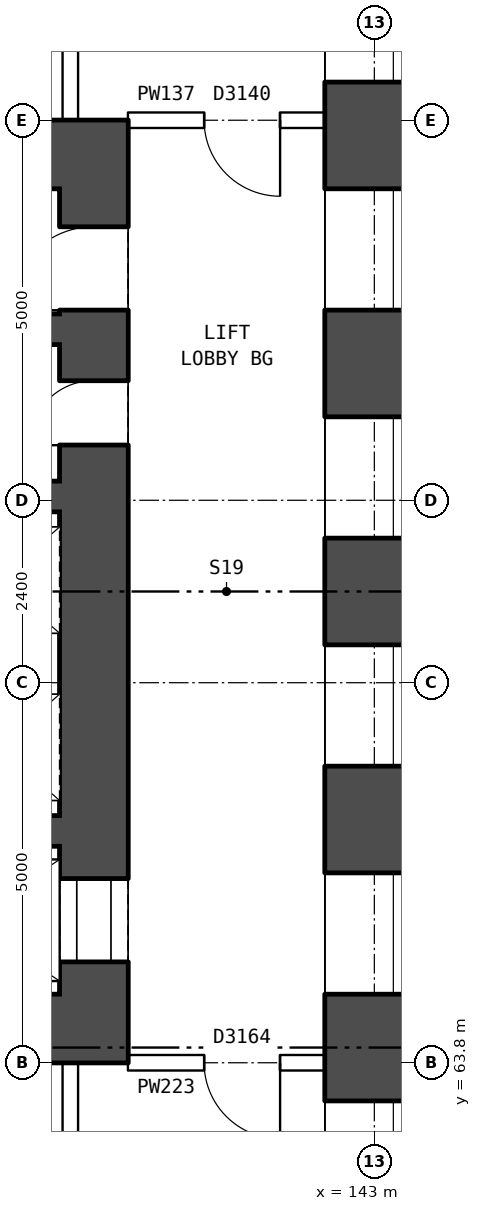
"""IFC4 building model, lengths in metres.
Left out: names, types, materials, properties, quantities, classifications, styles, units other than length and angle.
Written with IfcOpenShell. Run it as: python <this file> out.ifc"""

import sys

from ifc_helpers import new_model, si_unit, direction, frame, frame_2d, origin, place, context, subcontext, project, spatial, rectangle, extrude, element, fill, save


model = new_model("IFC4")
c1 = context("Model", 3, precision=1e-05, world=origin(), true_north=direction((0.0, 1.0)))
c2 = subcontext(c1, "Body", "Model", "MODEL_VIEW")
j1 = project(units=[si_unit("LENGTHUNIT", "METRE"), si_unit("PLANEANGLEUNIT", "RADIAN")], contexts=[c1])
p1 = place(None, origin())
s1 = spatial("IfcSite", under=j1, at=p1, CompositionType="ELEMENT")
p2 = place(p1, origin())
s2 = spatial("IfcBuilding", under=s1, at=p2, CompositionType="ELEMENT")
p3 = place(p2, frame((0.0, 0.0, 5.5)))
s3 = spatial("IfcBuildingStorey", under=s2, at=p3, CompositionType="ELEMENT", Elevation=5.5)
p4 = place(p3, frame((142.95, 56.4, -0.3), z_axis=(0.0, 0.0, 1.0), x_axis=(0.0, 1.0, 0.0)))
e1 = element("IfcWall", 1, at=p4, inside=s3, PredefinedType="SHEAR", context=c2, shape_type="SweptSolid", body=[
    extrude(rectangle(XDim=27.2, YDim=1.2, at=frame_2d((13.6, 0.0))), origin(), (0.0, 0.0, 1.0), 4.6),
])
p5 = place(p4, frame((2.3, 0.0, 0.8)))
e2 = element("IfcOpeningElement", 2, at=p5, cuts=e1, PredefinedType="OPENING", context=c2, shape_type="SweptSolid", body=[
    extrude(rectangle(XDim=1.6, YDim=1.8, at=frame_2d((0.8, 0.9))), frame((0.0, 0.61, 0.0), z_axis=(0.0, -1.0, 0.0), x_axis=(1.0, 0.0, 0.0)), (0.0, 0.0, 1.0), 1.22),
])
p6 = place(p4, frame((5.3, 0.0, 0.8)))
e3 = element("IfcOpeningElement", 3, at=p6, cuts=e1, PredefinedType="OPENING", context=c2, shape_type="SweptSolid", body=[
    extrude(rectangle(XDim=1.6, YDim=1.8, at=frame_2d((0.8, 0.9))), frame((0.0, 0.61, 0.0), z_axis=(0.0, -1.0, 0.0), x_axis=(1.0, 0.0, 0.0)), (0.0, 0.0, 1.0), 1.22),
])
p7 = place(p4, frame((8.3, 0.0, 0.8)))
e4 = element("IfcOpeningElement", 4, at=p7, cuts=e1, PredefinedType="OPENING", context=c2, shape_type="SweptSolid", body=[
    extrude(rectangle(XDim=1.6, YDim=1.8, at=frame_2d((0.8, 0.9))), frame((0.0, 0.61, 0.0), z_axis=(0.0, -1.0, 0.0), x_axis=(1.0, 0.0, 0.0)), (0.0, 0.0, 1.0), 1.22),
])
p8 = place(p4, frame((11.3, 0.0, 0.8)))
e5 = element("IfcOpeningElement", 5, at=p8, cuts=e1, PredefinedType="OPENING", context=c2, shape_type="SweptSolid", body=[
    extrude(rectangle(XDim=1.6, YDim=1.8, at=frame_2d((0.8, 0.9))), frame((0.0, 0.61, 0.0), z_axis=(0.0, -1.0, 0.0), x_axis=(1.0, 0.0, 0.0)), (0.0, 0.0, 1.0), 1.22),
])
p9 = place(p4, frame((14.3, 0.0, 0.8)))
e6 = element("IfcOpeningElement", 6, at=p9, cuts=e1, PredefinedType="OPENING", context=c2, shape_type="SweptSolid", body=[
    extrude(rectangle(XDim=1.6, YDim=1.8, at=frame_2d((0.8, 0.9))), frame((0.0, 0.61, 0.0), z_axis=(0.0, -1.0, 0.0), x_axis=(1.0, 0.0, 0.0)), (0.0, 0.0, 1.0), 1.22),
])
p10 = place(p4, frame((17.3, 0.0, 0.8)))
e7 = element("IfcOpeningElement", 7, at=p10, cuts=e1, PredefinedType="OPENING", context=c2, shape_type="SweptSolid", body=[
    extrude(rectangle(XDim=1.6, YDim=1.8, at=frame_2d((0.8, 0.9))), frame((0.0, 0.61, 0.0), z_axis=(0.0, -1.0, 0.0), x_axis=(1.0, 0.0, 0.0)), (0.0, 0.0, 1.0), 1.22),
])
p11 = place(p4, frame((20.3, 0.0, 0.8)))
e8 = element("IfcOpeningElement", 8, at=p11, cuts=e1, PredefinedType="OPENING", context=c2, shape_type="SweptSolid", body=[
    extrude(rectangle(XDim=1.6, YDim=1.8, at=frame_2d((0.8, 0.9))), frame((0.0, 0.61, 0.0), z_axis=(0.0, -1.0, 0.0), x_axis=(1.0, 0.0, 0.0)), (0.0, 0.0, 1.0), 1.22),
])
p12 = place(p4, frame((23.3, 0.0, 0.8)))
e9 = element("IfcOpeningElement", 9, at=p12, cuts=e1, PredefinedType="OPENING", context=c2, shape_type="SweptSolid", body=[
    extrude(rectangle(XDim=1.6, YDim=1.8, at=frame_2d((0.8, 0.9))), frame((0.0, 0.61, 0.0), z_axis=(0.0, -1.0, 0.0), x_axis=(1.0, 0.0, 0.0)), (0.0, 0.0, 1.0), 1.22),
])
p13 = place(p3, frame((139.31, 64.7, 0.0), z_axis=(0.0, 0.0, 1.0), x_axis=(0.0, 1.0, 0.0)))
e10 = element("IfcWall", 10, at=p13, inside=s3, PredefinedType="SHEAR", context=c2, shape_type="SweptSolid", body=[
    extrude(rectangle(XDim=10.6, YDim=0.9, at=frame_2d((5.3, 0.0))), origin(), (0.0, 0.0, 1.0), 4.3),
])
p14 = place(p13, frame((0.425, 0.0, 0.0)))
e11 = element("IfcOpeningElement", 11, at=p14, cuts=e10, PredefinedType="OPENING", context=c2, shape_type="SweptSolid", body=[
    extrude(rectangle(XDim=1.1, YDim=2.1, at=frame_2d((0.55, 1.05))), frame((0.0, 0.46, 0.0), z_axis=(0.0, -1.0, 0.0), x_axis=(1.0, 0.0, 0.0)), (0.0, 0.0, 1.0), 0.92),
])
p15 = place(p13, frame((9.0, 0.0, 0.0)))
e12 = element("IfcOpeningElement", 12, at=p15, cuts=e10, PredefinedType="OPENING", context=c2, shape_type="SweptSolid", body=[
    extrude(rectangle(XDim=1.1, YDim=2.1, at=frame_2d((0.55, 1.05))), frame((0.0, 0.46, 0.0), z_axis=(0.0, -1.0, 0.0), x_axis=(1.0, 0.0, 0.0)), (0.0, 0.0, 1.0), 0.92),
])
p16 = place(p13, frame((7.225, 0.0, 0.0)))
e13 = element("IfcOpeningElement", 13, at=p16, cuts=e10, PredefinedType="OPENING", context=c2, shape_type="SweptSolid", body=[
    extrude(rectangle(XDim=0.85, YDim=2.1, at=frame_2d((0.425, 1.05))), frame((0.0, 0.46, 0.0), z_axis=(0.0, -1.0, 0.0), x_axis=(1.0, 0.0, 0.0)), (0.0, 0.0, 1.0), 0.92),
])
for number, where, z_axis, x_axis in (
    (14, (139.76, 64.25, 0.0), (0.0, 0.0, 1.0), (-1.0, 0.0, 0.0)),
    (15, (139.76, 75.75, 0.0), (0.0, 0.0, 1.0), (-1.0, 0.0, 0.0)),
):
    element("IfcWall", number, at=place(p3, frame(where, z_axis=z_axis, x_axis=x_axis)), inside=s3, PredefinedType="SHEAR", context=c2, shape_type="SweptSolid", body=[
        extrude(rectangle(XDim=8.4, YDim=0.9, at=frame_2d((4.2, 0.0))), origin(), (0.0, 0.0, 1.0), 4.3),
    ])
p17 = place(p3, frame((138.86, 66.85, 0.0), z_axis=(0.0, 0.0, 1.0), x_axis=(-1.0, 0.0, 0.0)))
e16 = element("IfcWall", 16, at=p17, inside=s3, PredefinedType="SHEAR", context=c2, shape_type="SweptSolid", body=[
    extrude(rectangle(XDim=3.7, YDim=0.4, at=frame_2d((1.85, 0.0))), origin(), (0.0, 0.0, 1.0), 4.3),
])
p18 = place(p3, frame((138.86, 71.25, 0.0), z_axis=(0.0, 0.0, 1.0), x_axis=(-1.0, 0.0, 0.0)))
e17 = element("IfcWall", 17, at=p18, inside=s3, PredefinedType="SHEAR", context=c2, shape_type="SweptSolid", body=[
    extrude(rectangle(XDim=6.6, YDim=0.4, at=frame_2d((3.3, 0.0))), origin(), (0.0, 0.0, 1.0), 4.3),
])
p19 = place(p18, frame((4.25, 0.0, 0.0)))
e18 = element("IfcOpeningElement", 18, at=p19, cuts=e17, PredefinedType="OPENING", context=c2, shape_type="SweptSolid", body=[
    extrude(rectangle(XDim=1.1, YDim=2.1, at=frame_2d((0.55, 1.05))), frame((0.0, 0.21, 0.0), z_axis=(0.0, -1.0, 0.0), x_axis=(1.0, 0.0, 0.0)), (0.0, 0.0, 1.0), 0.42),
])
p20 = place(p18, frame((2.475, 0.0, 0.0)))
e19 = element("IfcOpeningElement", 19, at=p20, cuts=e17, PredefinedType="OPENING", context=c2, shape_type="SweptSolid", body=[
    extrude(rectangle(XDim=0.85, YDim=2.1, at=frame_2d((0.425, 1.05))), frame((0.0, 0.21, 0.0), z_axis=(0.0, -1.0, 0.0), x_axis=(1.0, 0.0, 0.0)), (0.0, 0.0, 1.0), 0.42),
])
p21 = place(p3, frame((138.86, 73.45, 0.0), z_axis=(0.0, 0.0, 1.0), x_axis=(-1.0, 0.0, 0.0)))
e20 = element("IfcWall", 20, at=p21, inside=s3, PredefinedType="SHEAR", context=c2, shape_type="SweptSolid", body=[
    extrude(rectangle(XDim=1.95, YDim=0.4, at=frame_2d((0.975, 0.0))), origin(), (0.0, 0.0, 1.0), 4.3),
])
p22 = place(p3, frame((139.76, 63.8, 0.0), z_axis=(0.0, 0.0, 1.0), x_axis=(1.0, 0.0, 0.0)))
e21 = element("IfcWall", 21, at=p22, inside=s3, PredefinedType="PARTITIONING", context=c2, shape_type="SweptSolid", body=[
    extrude(rectangle(XDim=2.59, YDim=0.2, at=frame_2d((1.295, 0.0))), origin(), (0.0, 0.0, 1.0), 4.3),
])
p23 = place(p22, frame((1.0, 0.0, 0.0)))
e22 = element("IfcOpeningElement", 22, at=p23, cuts=e21, PredefinedType="OPENING", context=c2, shape_type="SweptSolid", body=[
    extrude(rectangle(XDim=1.0, YDim=2.1, at=frame_2d((0.5, 1.05))), frame((0.0, 0.11, 0.0), z_axis=(0.0, -1.0, 0.0), x_axis=(1.0, 0.0, 0.0)), (0.0, 0.0, 1.0), 0.22),
])
p24 = place(p3, frame((139.76, 76.2, 0.0), z_axis=(0.0, 0.0, 1.0), x_axis=(1.0, 0.0, 0.0)))
e23 = element("IfcWall", 23, at=p24, inside=s3, PredefinedType="PARTITIONING", context=c2, shape_type="SweptSolid", body=[
    extrude(rectangle(XDim=2.59, YDim=0.2, at=frame_2d((1.295, 0.0))), origin(), (0.0, 0.0, 1.0), 4.3),
])
p25 = place(p24, frame((1.0, 0.0, 0.0)))
e24 = element("IfcOpeningElement", 24, at=p25, cuts=e23, PredefinedType="OPENING", context=c2, shape_type="SweptSolid", body=[
    extrude(rectangle(XDim=1.0, YDim=2.1, at=frame_2d((0.5, 1.05))), frame((0.0, 0.11, 0.0), z_axis=(0.0, -1.0, 0.0), x_axis=(1.0, 0.0, 0.0)), (0.0, 0.0, 1.0), 0.22),
])
for number, where, z_axis, x_axis in (
    (25, (139.0, 60.7, 0.0), (0.0, 0.0, 1.0), (0.0, 1.0, 0.0)),
    (26, (139.0, 76.2, 0.0), (0.0, 0.0, 1.0), (0.0, 1.0, 0.0)),
):
    element("IfcWall", number, at=place(p3, frame(where, z_axis=z_axis, x_axis=x_axis)), inside=s3, PredefinedType="PARTITIONING", context=c2, shape_type="SweptSolid", body=[
        extrude(rectangle(XDim=3.1, YDim=0.2, at=frame_2d((1.55, 0.0))), origin(), (0.0, 0.0, 1.0), 4.3),
    ])
p26 = place(p6, origin())
e27 = element("IfcWindow", 27, at=p26, inside=s3, PartitioningType="SINGLE_PANEL", PredefinedType="WINDOW", context=c2, shape_type="SweptSolid", body=[
    extrude(rectangle(XDim=1.6, YDim=1.8, at=frame_2d((0.8, 0.9))), frame((0.0, -0.27, 0.0), z_axis=(0.0, -1.0, 0.0), x_axis=(1.0, 0.0, 0.0)), (0.0, 0.0, 1.0), 0.06),
])
fill(e3, e27)
p27 = place(p7, origin())
e28 = element("IfcWindow", 28, at=p27, inside=s3, PartitioningType="SINGLE_PANEL", PredefinedType="WINDOW", context=c2, shape_type="SweptSolid", body=[
    extrude(rectangle(XDim=1.6, YDim=1.8, at=frame_2d((0.8, 0.9))), frame((0.0, -0.27, 0.0), z_axis=(0.0, -1.0, 0.0), x_axis=(1.0, 0.0, 0.0)), (0.0, 0.0, 1.0), 0.06),
])
fill(e4, e28)
p28 = place(p8, origin())
e29 = element("IfcWindow", 29, at=p28, inside=s3, PartitioningType="SINGLE_PANEL", PredefinedType="WINDOW", context=c2, shape_type="SweptSolid", body=[
    extrude(rectangle(XDim=1.6, YDim=1.8, at=frame_2d((0.8, 0.9))), frame((0.0, -0.27, 0.0), z_axis=(0.0, -1.0, 0.0), x_axis=(1.0, 0.0, 0.0)), (0.0, 0.0, 1.0), 0.06),
])
fill(e5, e29)
p29 = place(p9, origin())
e30 = element("IfcWindow", 30, at=p29, inside=s3, PartitioningType="SINGLE_PANEL", PredefinedType="WINDOW", context=c2, shape_type="SweptSolid", body=[
    extrude(rectangle(XDim=1.6, YDim=1.8, at=frame_2d((0.8, 0.9))), frame((0.0, -0.27, 0.0), z_axis=(0.0, -1.0, 0.0), x_axis=(1.0, 0.0, 0.0)), (0.0, 0.0, 1.0), 0.06),
])
fill(e6, e30)
p30 = place(p10, origin())
e31 = element("IfcWindow", 31, at=p30, inside=s3, PartitioningType="SINGLE_PANEL", PredefinedType="WINDOW", context=c2, shape_type="SweptSolid", body=[
    extrude(rectangle(XDim=1.6, YDim=1.8, at=frame_2d((0.8, 0.9))), frame((0.0, -0.27, 0.0), z_axis=(0.0, -1.0, 0.0), x_axis=(1.0, 0.0, 0.0)), (0.0, 0.0, 1.0), 0.06),
])
fill(e7, e31)
p31 = place(p11, origin())
e32 = element("IfcWindow", 32, at=p31, inside=s3, PartitioningType="SINGLE_PANEL", PredefinedType="WINDOW", context=c2, shape_type="SweptSolid", body=[
    extrude(rectangle(XDim=1.6, YDim=1.8, at=frame_2d((0.8, 0.9))), frame((0.0, -0.27, 0.0), z_axis=(0.0, -1.0, 0.0), x_axis=(1.0, 0.0, 0.0)), (0.0, 0.0, 1.0), 0.06),
])
fill(e8, e32)
p32 = place(p14, origin())
e33 = element("IfcDoor", 33, at=p32, inside=s3, OperationType="DOUBLE_DOOR_SLIDING", PredefinedType="DOOR", context=c2, shape_type="SweptSolid", body=[
    extrude(rectangle(XDim=1.1, YDim=2.1, at=frame_2d((0.55, 1.05))), frame((0.0, 0.435, 0.0), z_axis=(0.0, -1.0, 0.0), x_axis=(1.0, 0.0, 0.0)), (0.0, 0.0, 1.0), 0.05),
])
fill(e11, e33)
p33 = place(p15, origin())
e34 = element("IfcDoor", 34, at=p33, inside=s3, OperationType="SINGLE_SWING_LEFT", PredefinedType="DOOR", context=c2, shape_type="SweptSolid", body=[
    extrude(rectangle(XDim=1.1, YDim=2.1, at=frame_2d((0.55, 1.05))), frame((0.0, 0.435, 0.0), z_axis=(0.0, -1.0, 0.0), x_axis=(1.0, 0.0, 0.0)), (0.0, 0.0, 1.0), 0.05),
])
fill(e12, e34)
p34 = place(p16, origin())
e35 = element("IfcDoor", 35, at=p34, inside=s3, OperationType="SINGLE_SWING_LEFT", PredefinedType="DOOR", context=c2, shape_type="SweptSolid", body=[
    extrude(rectangle(XDim=0.85, YDim=2.1, at=frame_2d((0.425, 1.05))), frame((0.0, 0.435, 0.0), z_axis=(0.0, -1.0, 0.0), x_axis=(1.0, 0.0, 0.0)), (0.0, 0.0, 1.0), 0.05),
])
fill(e13, e35)
p35 = place(p23, frame((1.0, 0.0, 0.0), z_axis=(0.0, 0.0, 1.0), x_axis=(-1.0, 0.0, 0.0)))
e36 = element("IfcDoor", 36, at=p35, inside=s3, OperationType="SINGLE_SWING_LEFT", PredefinedType="DOOR", context=c2, shape_type="SweptSolid", body=[
    extrude(rectangle(XDim=1.0, YDim=2.1, at=frame_2d((0.5, 1.05))), frame((0.0, 0.025, 0.0), z_axis=(0.0, -1.0, 0.0), x_axis=(1.0, 0.0, 0.0)), (0.0, 0.0, 1.0), 0.05),
])
fill(e22, e36)
p36 = place(p25, frame((1.0, 0.0, 0.0), z_axis=(0.0, 0.0, 1.0), x_axis=(-1.0, 0.0, 0.0)))
e37 = element("IfcDoor", 37, at=p36, inside=s3, OperationType="SINGLE_SWING_LEFT", PredefinedType="DOOR", context=c2, shape_type="SweptSolid", body=[
    extrude(rectangle(XDim=1.0, YDim=2.1, at=frame_2d((0.5, 1.05))), frame((0.0, 0.025, 0.0), z_axis=(0.0, -1.0, 0.0), x_axis=(1.0, 0.0, 0.0)), (0.0, 0.0, 1.0), 0.05),
])
fill(e24, e37)
save(model, sys.argv[1])
